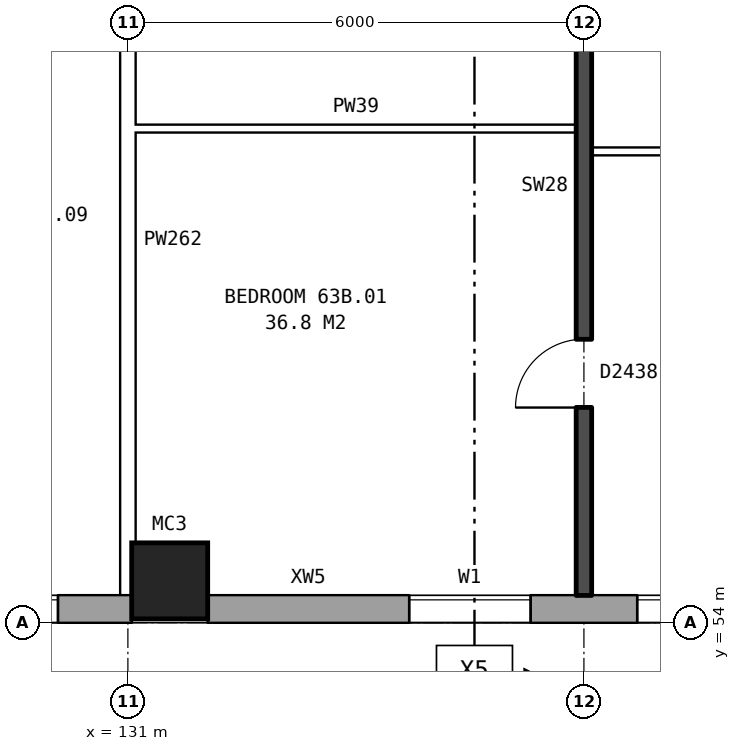
"""IFC4 building model, lengths in metres.
Left out: names, types, materials, properties, quantities, classifications, styles, units other than length and angle.
Written with IfcOpenShell. Run it as: python <this file> out.ifc"""

import sys

from ifc_helpers import new_model, si_unit, direction, frame, frame_2d, origin, origin_2d, place, context, subcontext, project, spatial, rectangle, hollow_rectangle, extrude, element, fill, save


model = new_model("IFC4")
c1 = context("Model", 3, precision=1e-05, world=origin(), true_north=direction((0.0, 1.0)))
c2 = subcontext(c1, "Body", "Model", "MODEL_VIEW")
j1 = project(units=[si_unit("LENGTHUNIT", "METRE"), si_unit("PLANEANGLEUNIT", "RADIAN")], contexts=[c1])
p1 = place(None, origin())
s1 = spatial("IfcSite", under=j1, at=p1, CompositionType="ELEMENT")
p2 = place(p1, origin())
s2 = spatial("IfcBuilding", under=s1, at=p2, CompositionType="ELEMENT")
p3 = place(p2, frame((0.0, 0.0, 224.5)))
s3 = spatial("IfcBuildingStorey", under=s2, at=p3, CompositionType="ELEMENT", Elevation=224.5)
p4 = place(p3, frame((131.55, 54.55, 0.0), z_axis=(0.0, 0.0, 1.0), x_axis=(1.0, 0.0, 0.0)))
e1 = element("IfcColumn", 1, at=p4, inside=s3, PredefinedType="COLUMN", context=c2, shape_type="SweptSolid", body=[
    extrude(hollow_rectangle(XDim=1.0, YDim=1.0, WallThickness=0.055, at=origin_2d()), origin(), (0.0, 0.0, 1.0), 3.1),
])
p5 = place(p3, frame((75.95, 54.18, 0.0), z_axis=(0.0, 0.0, 1.0), x_axis=(1.0, 0.0, 0.0)))
e2 = element("IfcWall", 2, at=p5, inside=s3, PredefinedType="STANDARD", context=c2, shape_type="SweptSolid", body=[
    extrude(rectangle(XDim=55.1, YDim=0.36, at=frame_2d((27.55, 0.0))), origin(), (0.0, 0.0, 1.0), 2.85),
])
p6 = place(p5, frame((0.969, 0.0, 0.8)))
e3 = element("IfcOpeningElement", 3, at=p6, cuts=e2, PredefinedType="OPENING", context=c2, shape_type="SweptSolid", body=[
    extrude(rectangle(XDim=1.6, YDim=1.8, at=frame_2d((0.8, 0.9))), frame((0.0, 0.19, 0.0), z_axis=(0.0, -1.0, 0.0), x_axis=(1.0, 0.0, 0.0)), (0.0, 0.0, 1.0), 0.38),
])
p7 = place(p5, frame((4.406, 0.0, 0.8)))
e4 = element("IfcOpeningElement", 4, at=p7, cuts=e2, PredefinedType="OPENING", context=c2, shape_type="SweptSolid", body=[
    extrude(rectangle(XDim=1.6, YDim=1.8, at=frame_2d((0.8, 0.9))), frame((0.0, 0.19, 0.0), z_axis=(0.0, -1.0, 0.0), x_axis=(1.0, 0.0, 0.0)), (0.0, 0.0, 1.0), 0.38),
])
p8 = place(p5, frame((7.844, 0.0, 0.8)))
e5 = element("IfcOpeningElement", 5, at=p8, cuts=e2, PredefinedType="OPENING", context=c2, shape_type="SweptSolid", body=[
    extrude(rectangle(XDim=1.6, YDim=1.8, at=frame_2d((0.8, 0.9))), frame((0.0, 0.19, 0.0), z_axis=(0.0, -1.0, 0.0), x_axis=(1.0, 0.0, 0.0)), (0.0, 0.0, 1.0), 0.38),
])
p9 = place(p5, frame((11.281, 0.0, 0.8)))
e6 = element("IfcOpeningElement", 6, at=p9, cuts=e2, PredefinedType="OPENING", context=c2, shape_type="SweptSolid", body=[
    extrude(rectangle(XDim=1.6, YDim=1.8, at=frame_2d((0.8, 0.9))), frame((0.0, 0.19, 0.0), z_axis=(0.0, -1.0, 0.0), x_axis=(1.0, 0.0, 0.0)), (0.0, 0.0, 1.0), 0.38),
])
p10 = place(p5, frame((14.719, 0.0, 0.8)))
e7 = element("IfcOpeningElement", 7, at=p10, cuts=e2, PredefinedType="OPENING", context=c2, shape_type="SweptSolid", body=[
    extrude(rectangle(XDim=1.6, YDim=1.8, at=frame_2d((0.8, 0.9))), frame((0.0, 0.19, 0.0), z_axis=(0.0, -1.0, 0.0), x_axis=(1.0, 0.0, 0.0)), (0.0, 0.0, 1.0), 0.38),
])
p11 = place(p5, frame((18.156, 0.0, 0.8)))
e8 = element("IfcOpeningElement", 8, at=p11, cuts=e2, PredefinedType="OPENING", context=c2, shape_type="SweptSolid", body=[
    extrude(rectangle(XDim=1.6, YDim=1.8, at=frame_2d((0.8, 0.9))), frame((0.0, 0.19, 0.0), z_axis=(0.0, -1.0, 0.0), x_axis=(1.0, 0.0, 0.0)), (0.0, 0.0, 1.0), 0.38),
])
p12 = place(p5, frame((21.594, 0.0, 0.8)))
e9 = element("IfcOpeningElement", 9, at=p12, cuts=e2, PredefinedType="OPENING", context=c2, shape_type="SweptSolid", body=[
    extrude(rectangle(XDim=1.6, YDim=1.8, at=frame_2d((0.8, 0.9))), frame((0.0, 0.19, 0.0), z_axis=(0.0, -1.0, 0.0), x_axis=(1.0, 0.0, 0.0)), (0.0, 0.0, 1.0), 0.38),
])
p13 = place(p5, frame((25.031, 0.0, 0.8)))
e10 = element("IfcOpeningElement", 10, at=p13, cuts=e2, PredefinedType="OPENING", context=c2, shape_type="SweptSolid", body=[
    extrude(rectangle(XDim=1.6, YDim=1.8, at=frame_2d((0.8, 0.9))), frame((0.0, 0.19, 0.0), z_axis=(0.0, -1.0, 0.0), x_axis=(1.0, 0.0, 0.0)), (0.0, 0.0, 1.0), 0.38),
])
p14 = place(p5, frame((28.469, 0.0, 0.8)))
e11 = element("IfcOpeningElement", 11, at=p14, cuts=e2, PredefinedType="OPENING", context=c2, shape_type="SweptSolid", body=[
    extrude(rectangle(XDim=1.6, YDim=1.8, at=frame_2d((0.8, 0.9))), frame((0.0, 0.19, 0.0), z_axis=(0.0, -1.0, 0.0), x_axis=(1.0, 0.0, 0.0)), (0.0, 0.0, 1.0), 0.38),
])
p15 = place(p5, frame((31.906, 0.0, 0.8)))
e12 = element("IfcOpeningElement", 12, at=p15, cuts=e2, PredefinedType="OPENING", context=c2, shape_type="SweptSolid", body=[
    extrude(rectangle(XDim=1.6, YDim=1.8, at=frame_2d((0.8, 0.9))), frame((0.0, 0.19, 0.0), z_axis=(0.0, -1.0, 0.0), x_axis=(1.0, 0.0, 0.0)), (0.0, 0.0, 1.0), 0.38),
])
p16 = place(p5, frame((35.344, 0.0, 0.8)))
e13 = element("IfcOpeningElement", 13, at=p16, cuts=e2, PredefinedType="OPENING", context=c2, shape_type="SweptSolid", body=[
    extrude(rectangle(XDim=1.6, YDim=1.8, at=frame_2d((0.8, 0.9))), frame((0.0, 0.19, 0.0), z_axis=(0.0, -1.0, 0.0), x_axis=(1.0, 0.0, 0.0)), (0.0, 0.0, 1.0), 0.38),
])
p17 = place(p5, frame((38.781, 0.0, 0.8)))
e14 = element("IfcOpeningElement", 14, at=p17, cuts=e2, PredefinedType="OPENING", context=c2, shape_type="SweptSolid", body=[
    extrude(rectangle(XDim=1.6, YDim=1.8, at=frame_2d((0.8, 0.9))), frame((0.0, 0.19, 0.0), z_axis=(0.0, -1.0, 0.0), x_axis=(1.0, 0.0, 0.0)), (0.0, 0.0, 1.0), 0.38),
])
p18 = place(p5, frame((42.219, 0.0, 0.8)))
e15 = element("IfcOpeningElement", 15, at=p18, cuts=e2, PredefinedType="OPENING", context=c2, shape_type="SweptSolid", body=[
    extrude(rectangle(XDim=1.6, YDim=1.8, at=frame_2d((0.8, 0.9))), frame((0.0, 0.19, 0.0), z_axis=(0.0, -1.0, 0.0), x_axis=(1.0, 0.0, 0.0)), (0.0, 0.0, 1.0), 0.38),
])
p19 = place(p5, frame((45.656, 0.0, 0.8)))
e16 = element("IfcOpeningElement", 16, at=p19, cuts=e2, PredefinedType="OPENING", context=c2, shape_type="SweptSolid", body=[
    extrude(rectangle(XDim=1.6, YDim=1.8, at=frame_2d((0.8, 0.9))), frame((0.0, 0.19, 0.0), z_axis=(0.0, -1.0, 0.0), x_axis=(1.0, 0.0, 0.0)), (0.0, 0.0, 1.0), 0.38),
])
p20 = place(p5, frame((49.094, 0.0, 0.8)))
e17 = element("IfcOpeningElement", 17, at=p20, cuts=e2, PredefinedType="OPENING", context=c2, shape_type="SweptSolid", body=[
    extrude(rectangle(XDim=1.6, YDim=1.8, at=frame_2d((0.8, 0.9))), frame((0.0, 0.19, 0.0), z_axis=(0.0, -1.0, 0.0), x_axis=(1.0, 0.0, 0.0)), (0.0, 0.0, 1.0), 0.38),
])
p21 = place(p5, frame((52.531, 0.0, 0.8)))
e18 = element("IfcOpeningElement", 18, at=p21, cuts=e2, PredefinedType="OPENING", context=c2, shape_type="SweptSolid", body=[
    extrude(rectangle(XDim=1.6, YDim=1.8, at=frame_2d((0.8, 0.9))), frame((0.0, 0.19, 0.0), z_axis=(0.0, -1.0, 0.0), x_axis=(1.0, 0.0, 0.0)), (0.0, 0.0, 1.0), 0.38),
])
p22 = place(p3, frame((132.05, 54.18, 0.0), z_axis=(0.0, 0.0, 1.0), x_axis=(1.0, 0.0, 0.0)))
e19 = element("IfcWall", 19, at=p22, inside=s3, PredefinedType="STANDARD", context=c2, shape_type="SweptSolid", body=[
    extrude(rectangle(XDim=33.875, YDim=0.36, at=frame_2d((16.938, 0.0))), origin(), (0.0, 0.0, 1.0), 2.85),
])
p23 = place(p22, frame((2.65, 0.0, 0.8)))
e20 = element("IfcOpeningElement", 20, at=p23, cuts=e19, PredefinedType="OPENING", context=c2, shape_type="SweptSolid", body=[
    extrude(rectangle(XDim=1.6, YDim=1.8, at=frame_2d((0.8, 0.9))), frame((0.0, 0.19, 0.0), z_axis=(0.0, -1.0, 0.0), x_axis=(1.0, 0.0, 0.0)), (0.0, 0.0, 1.0), 0.38),
])
p24 = place(p22, frame((5.65, 0.0, 0.8)))
e21 = element("IfcOpeningElement", 21, at=p24, cuts=e19, PredefinedType="OPENING", context=c2, shape_type="SweptSolid", body=[
    extrude(rectangle(XDim=1.6, YDim=1.8, at=frame_2d((0.8, 0.9))), frame((0.0, 0.19, 0.0), z_axis=(0.0, -1.0, 0.0), x_axis=(1.0, 0.0, 0.0)), (0.0, 0.0, 1.0), 0.38),
])
p25 = place(p22, frame((8.65, 0.0, 0.8)))
e22 = element("IfcOpeningElement", 22, at=p25, cuts=e19, PredefinedType="OPENING", context=c2, shape_type="SweptSolid", body=[
    extrude(rectangle(XDim=1.6, YDim=1.8, at=frame_2d((0.8, 0.9))), frame((0.0, 0.19, 0.0), z_axis=(0.0, -1.0, 0.0), x_axis=(1.0, 0.0, 0.0)), (0.0, 0.0, 1.0), 0.38),
])
p26 = place(p22, frame((11.15, 0.0, 1.7)))
e23 = element("IfcOpeningElement", 23, at=p26, cuts=e19, PredefinedType="OPENING", context=c2, shape_type="SweptSolid", body=[
    extrude(rectangle(XDim=0.6, YDim=0.9, at=frame_2d((0.3, 0.45))), frame((0.0, 0.19, 0.0), z_axis=(0.0, -1.0, 0.0), x_axis=(1.0, 0.0, 0.0)), (0.0, 0.0, 1.0), 0.38),
])
p27 = place(p22, frame((14.65, 0.0, 0.8)))
e24 = element("IfcOpeningElement", 24, at=p27, cuts=e19, PredefinedType="OPENING", context=c2, shape_type="SweptSolid", body=[
    extrude(rectangle(XDim=1.6, YDim=1.8, at=frame_2d((0.8, 0.9))), frame((0.0, 0.19, 0.0), z_axis=(0.0, -1.0, 0.0), x_axis=(1.0, 0.0, 0.0)), (0.0, 0.0, 1.0), 0.38),
])
p28 = place(p22, frame((17.65, 0.0, 0.8)))
e25 = element("IfcOpeningElement", 25, at=p28, cuts=e19, PredefinedType="OPENING", context=c2, shape_type="SweptSolid", body=[
    extrude(rectangle(XDim=1.6, YDim=1.8, at=frame_2d((0.8, 0.9))), frame((0.0, 0.19, 0.0), z_axis=(0.0, -1.0, 0.0), x_axis=(1.0, 0.0, 0.0)), (0.0, 0.0, 1.0), 0.38),
])
p29 = place(p22, frame((20.65, 0.0, 0.8)))
e26 = element("IfcOpeningElement", 26, at=p29, cuts=e19, PredefinedType="OPENING", context=c2, shape_type="SweptSolid", body=[
    extrude(rectangle(XDim=1.6, YDim=1.8, at=frame_2d((0.8, 0.9))), frame((0.0, 0.19, 0.0), z_axis=(0.0, -1.0, 0.0), x_axis=(1.0, 0.0, 0.0)), (0.0, 0.0, 1.0), 0.38),
])
p30 = place(p22, frame((24.65, 0.0, 0.8)))
e27 = element("IfcOpeningElement", 27, at=p30, cuts=e19, PredefinedType="OPENING", context=c2, shape_type="SweptSolid", body=[
    extrude(rectangle(XDim=1.6, YDim=1.8, at=frame_2d((0.8, 0.9))), frame((0.0, 0.19, 0.0), z_axis=(0.0, -1.0, 0.0), x_axis=(1.0, 0.0, 0.0)), (0.0, 0.0, 1.0), 0.38),
])
p31 = place(p22, frame((26.65, 0.0, 0.8)))
e28 = element("IfcOpeningElement", 28, at=p31, cuts=e19, PredefinedType="OPENING", context=c2, shape_type="SweptSolid", body=[
    extrude(rectangle(XDim=1.6, YDim=1.8, at=frame_2d((0.8, 0.9))), frame((0.0, 0.19, 0.0), z_axis=(0.0, -1.0, 0.0), x_axis=(1.0, 0.0, 0.0)), (0.0, 0.0, 1.0), 0.38),
])
p32 = place(p22, frame((29.65, 0.0, 0.8)))
e29 = element("IfcOpeningElement", 29, at=p32, cuts=e19, PredefinedType="OPENING", context=c2, shape_type="SweptSolid", body=[
    extrude(rectangle(XDim=1.6, YDim=1.8, at=frame_2d((0.8, 0.9))), frame((0.0, 0.19, 0.0), z_axis=(0.0, -1.0, 0.0), x_axis=(1.0, 0.0, 0.0)), (0.0, 0.0, 1.0), 0.38),
])
p33 = place(p22, frame((13.2, 0.0, 0.8)))
e30 = element("IfcOpeningElement", 30, at=p33, cuts=e19, PredefinedType="OPENING", context=c2, shape_type="SweptSolid", body=[
    extrude(rectangle(XDim=0.6, YDim=1.5, at=frame_2d((0.3, 0.75))), frame((0.0, 0.19, 0.0), z_axis=(0.0, -1.0, 0.0), x_axis=(1.0, 0.0, 0.0)), (0.0, 0.0, 1.0), 0.38),
])
p34 = place(p3, frame((137.1, 60.2, 0.0), z_axis=(0.0, 0.0, 1.0), x_axis=(1.0, 0.0, 0.0)))
e31 = element("IfcWall", 31, at=p34, inside=s3, PredefinedType="PARTITIONING", context=c2, shape_type="SweptSolid", body=[
    extrude(rectangle(XDim=5.8, YDim=0.1, at=frame_2d((2.9, 0.0))), origin(), (0.0, 0.0, 1.0), 2.85),
])
p35 = place(p34, frame((1.3, 0.0, 0.0)))
e32 = element("IfcOpeningElement", 32, at=p35, cuts=e31, PredefinedType="OPENING", context=c2, shape_type="SweptSolid", body=[
    extrude(rectangle(XDim=0.9, YDim=2.1, at=frame_2d((0.45, 1.05))), frame((0.0, 0.06, 0.0), z_axis=(0.0, -1.0, 0.0), x_axis=(1.0, 0.0, 0.0)), (0.0, 0.0, 1.0), 0.12),
])
p36 = place(p34, frame((4.2, 0.0, 0.0)))
e33 = element("IfcOpeningElement", 33, at=p36, cuts=e31, PredefinedType="OPENING", context=c2, shape_type="SweptSolid", body=[
    extrude(rectangle(XDim=0.9, YDim=2.1, at=frame_2d((0.45, 1.05))), frame((0.0, 0.06, 0.0), z_axis=(0.0, -1.0, 0.0), x_axis=(1.0, 0.0, 0.0)), (0.0, 0.0, 1.0), 0.12),
])
p37 = place(p3, frame((131.1, 60.5, 0.0), z_axis=(0.0, 0.0, 1.0), x_axis=(1.0, 0.0, 0.0)))
e34 = element("IfcWall", 34, at=p37, inside=s3, PredefinedType="PARTITIONING", context=c2, shape_type="SweptSolid", body=[
    extrude(rectangle(XDim=5.8, YDim=0.1, at=frame_2d((2.9, 0.0))), origin(), (0.0, 0.0, 1.0), 2.85),
])
p38 = place(p3, frame((131.0, 54.36, 0.0), z_axis=(0.0, 0.0, 1.0), x_axis=(0.0, 1.0, 0.0)))
e35 = element("IfcWall", 35, at=p38, inside=s3, PredefinedType="PARTITIONING", context=c2, shape_type="SweptSolid", body=[
    extrude(rectangle(XDim=9.34, YDim=0.2, at=frame_2d((4.67, 0.0))), origin(), (0.0, 0.0, 1.0), 2.85),
])
p39 = place(p3, frame((137.0, 54.36, 0.0), z_axis=(0.0, 0.0, 1.0), x_axis=(0.0, 1.0, 0.0)))
e36 = element("IfcWall", 36, at=p39, inside=s3, PredefinedType="SOLIDWALL", context=c2, shape_type="SweptSolid", body=[
    extrude(rectangle(XDim=9.44, YDim=0.2, at=frame_2d((4.72, 0.0))), origin(), (0.0, 0.0, 1.0), 2.85),
])
p40 = place(p39, frame((2.47, 0.0, 0.0)))
e37 = element("IfcOpeningElement", 37, at=p40, cuts=e36, PredefinedType="OPENING", context=c2, shape_type="SweptSolid", body=[
    extrude(rectangle(XDim=0.9, YDim=2.1, at=frame_2d((0.45, 1.05))), frame((0.0, 0.11, 0.0), z_axis=(0.0, -1.0, 0.0), x_axis=(1.0, 0.0, 0.0)), (0.0, 0.0, 1.0), 0.22),
])
p41 = place(p39, frame((7.39, 0.0, 0.0)))
e38 = element("IfcOpeningElement", 38, at=p41, cuts=e36, PredefinedType="OPENING", context=c2, shape_type="SweptSolid", body=[
    extrude(rectangle(XDim=0.8, YDim=2.1, at=frame_2d((0.4, 1.05))), frame((0.0, 0.11, 0.0), z_axis=(0.0, -1.0, 0.0), x_axis=(1.0, 0.0, 0.0)), (0.0, 0.0, 1.0), 0.22),
])
p42 = place(p21, origin())
e39 = element("IfcWindow", 39, at=p42, inside=s3, PartitioningType="SINGLE_PANEL", PredefinedType="WINDOW", context=c2, shape_type="SweptSolid", body=[
    extrude(rectangle(XDim=1.6, YDim=1.8, at=frame_2d((0.8, 0.9))), frame((0.0, 0.15, 0.0), z_axis=(0.0, -1.0, 0.0), x_axis=(1.0, 0.0, 0.0)), (0.0, 0.0, 1.0), 0.06),
])
fill(e18, e39)
p43 = place(p23, origin())
e40 = element("IfcWindow", 40, at=p43, inside=s3, PartitioningType="SINGLE_PANEL", PredefinedType="WINDOW", context=c2, shape_type="SweptSolid", body=[
    extrude(rectangle(XDim=1.6, YDim=1.8, at=frame_2d((0.8, 0.9))), frame((0.0, 0.15, 0.0), z_axis=(0.0, -1.0, 0.0), x_axis=(1.0, 0.0, 0.0)), (0.0, 0.0, 1.0), 0.06),
])
fill(e20, e40)
p44 = place(p24, origin())
e41 = element("IfcWindow", 41, at=p44, inside=s3, PartitioningType="SINGLE_PANEL", PredefinedType="WINDOW", context=c2, shape_type="SweptSolid", body=[
    extrude(rectangle(XDim=1.6, YDim=1.8, at=frame_2d((0.8, 0.9))), frame((0.0, 0.15, 0.0), z_axis=(0.0, -1.0, 0.0), x_axis=(1.0, 0.0, 0.0)), (0.0, 0.0, 1.0), 0.06),
])
fill(e21, e41)
p45 = place(p40, origin())
e42 = element("IfcDoor", 42, at=p45, inside=s3, OperationType="SINGLE_SWING_LEFT", PredefinedType="DOOR", context=c2, shape_type="SweptSolid", body=[
    extrude(rectangle(XDim=0.9, YDim=2.1, at=frame_2d((0.45, 1.05))), frame((0.0, 0.025, 0.0), z_axis=(0.0, -1.0, 0.0), x_axis=(1.0, 0.0, 0.0)), (0.0, 0.0, 1.0), 0.05),
])
fill(e37, e42)
save(model, sys.argv[1])
